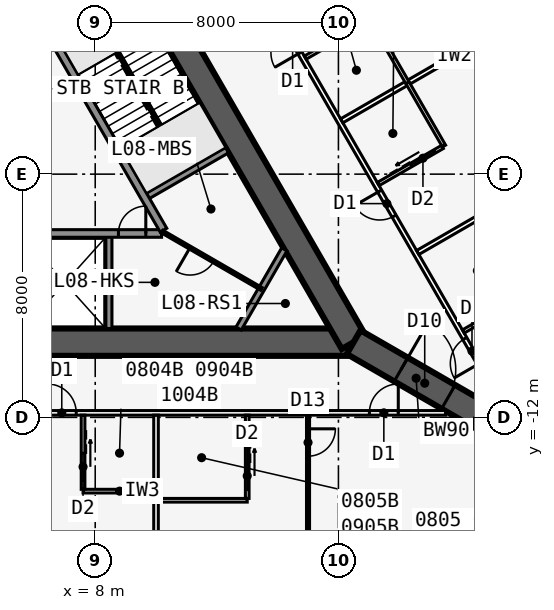
"""IFC4 building model, lengths in metres.
Left out: names, types, materials, properties, quantities, classifications, styles, units other than length and angle.
Written with IfcOpenShell. Run it as: python <this file> out.ifc"""

import sys

from ifc_helpers import new_model, si_unit, direction, frame, frame_2d, origin, place, context, subcontext, project, spatial, rectangle, extrude, element, fill, save


model = new_model("IFC4")
c1 = context("Model", 3, precision=1e-05, world=origin(), true_north=direction((0.0, 1.0)))
c2 = subcontext(c1, "Body", "Model", "MODEL_VIEW")
j1 = project(units=[si_unit("LENGTHUNIT", "METRE"), si_unit("PLANEANGLEUNIT", "RADIAN")], contexts=[c1])
p1 = place(None, origin())
s1 = spatial("IfcSite", under=j1, at=p1, CompositionType="ELEMENT")
p2 = place(p1, origin())
s2 = spatial("IfcBuilding", under=s1, at=p2, CompositionType="ELEMENT")
p3 = place(p2, frame((0.0, 0.0, 38.7)))
s3 = spatial("IfcBuildingStorey", under=s2, at=p3, CompositionType="ELEMENT", Elevation=38.7)
p4 = place(p3, frame((-16.5, -9.526, 0.0), z_axis=(0.0, 0.0, 1.0), x_axis=(1.0, 0.0, 0.0)))
e1 = element("IfcWall", 1, at=p4, inside=s3, PredefinedType="SHEAR", context=c2, shape_type="SweptSolid", body=[
    extrude(rectangle(XDim=33.0, YDim=0.9, at=frame_2d((16.5, 0.0))), origin(), (0.0, 0.0, 1.0), 3.4),
])
p5 = place(p4, frame((14.05, 0.0, 0.0)))
e2 = element("IfcOpeningElement", 2, at=p5, cuts=e1, PredefinedType="OPENING", context=c2, shape_type="SweptSolid", body=[
    extrude(rectangle(XDim=1.8, YDim=2.13, at=frame_2d((0.9, 1.065))), frame((0.0, 0.46, 0.0), z_axis=(0.0, -1.0, 0.0), x_axis=(1.0, 0.0, 0.0)), (0.0, 0.0, 1.0), 0.92),
])
p6 = place(p3, frame((-0.55, -5.951, 0.0), z_axis=(0.0, 0.0, 1.0), x_axis=(1.0, 0.0, 0.0)))
e3 = element("IfcWall", 3, at=p6, inside=s3, PredefinedType="SOLIDWALL", context=c2, shape_type="SweptSolid", body=[
    extrude(rectangle(XDim=10.733, YDim=0.25, at=frame_2d((5.366, 0.0))), origin(), (0.0, 0.0, 1.0), 3.235),
])
p7 = place(p6, frame((9.314, 0.0, 0.0)))
e4 = element("IfcOpeningElement", 4, at=p7, cuts=e3, PredefinedType="OPENING", context=c2, shape_type="SweptSolid", body=[
    extrude(rectangle(XDim=0.9, YDim=2.13, at=frame_2d((0.45, 1.065))), frame((0.0, 0.135, 0.0), z_axis=(0.0, -1.0, 0.0), x_axis=(1.0, 0.0, 0.0)), (0.0, 0.0, 1.0), 0.27),
])
p8 = place(p6, frame((1.05, 0.0, 0.0)))
e5 = element("IfcOpeningElement", 5, at=p8, cuts=e3, PredefinedType="OPENING", context=c2, shape_type="SweptSolid", body=[
    extrude(rectangle(XDim=1.1, YDim=2.13, at=frame_2d((0.55, 1.065))), frame((0.0, 0.135, 0.0), z_axis=(0.0, -1.0, 0.0), x_axis=(1.0, 0.0, 0.0)), (0.0, 0.0, 1.0), 0.27),
])
p9 = place(p6, frame((4.05, 0.0, 0.0)))
e6 = element("IfcOpeningElement", 6, at=p9, cuts=e3, PredefinedType="OPENING", context=c2, shape_type="SweptSolid", body=[
    extrude(rectangle(XDim=1.1, YDim=2.13, at=frame_2d((0.55, 1.065))), frame((0.0, 0.135, 0.0), z_axis=(0.0, -1.0, 0.0), x_axis=(1.0, 0.0, 0.0)), (0.0, 0.0, 1.0), 0.27),
])
p10 = place(p3, frame((8.45, -5.951, 0.0), z_axis=(0.0, 0.0, 1.0), x_axis=(0.0, -1.0, 0.0)))
e7 = element("IfcWall", 7, at=p10, inside=s3, PredefinedType="SOLIDWALL", context=c2, shape_type="SweptSolid", body=[
    extrude(rectangle(XDim=3.125, YDim=0.2, at=frame_2d((1.562, 0.0))), origin(), (0.0, 0.0, 1.0), 3.235),
])
p11 = place(p3, frame((16.5, -9.526, 0.0), z_axis=(0.0, 0.0, 1.0), x_axis=(-0.499999749417, 0.866025548458, 0.0)))
e8 = element("IfcWall", 8, at=p11, inside=s3, PredefinedType="SHEAR", context=c2, shape_type="SweptSolid", body=[
    extrude(rectangle(XDim=33.0, YDim=0.9, at=frame_2d((16.5, 0.0))), origin(), (0.0, 0.0, 1.0), 3.4),
])
p12 = place(p11, frame((14.15, 0.0, 0.0)))
e9 = element("IfcOpeningElement", 9, at=p12, cuts=e8, PredefinedType="OPENING", context=c2, shape_type="SweptSolid", body=[
    extrude(rectangle(XDim=1.8, YDim=2.13, at=frame_2d((0.9, 1.065))), frame((0.0, 0.46, 0.0), z_axis=(0.0, -1.0, 0.0), x_axis=(1.0, 0.0, 0.0)), (0.0, 0.0, 1.0), 0.92),
])
p13 = place(p11, frame((12.6, 0.0, 0.0)))
e10 = element("IfcOpeningElement", 10, at=p13, cuts=e8, PredefinedType="OPENING", context=c2, shape_type="SweptSolid", body=[
    extrude(rectangle(XDim=1.0, YDim=2.13, at=frame_2d((0.5, 1.065))), frame((0.0, 0.46, 0.0), z_axis=(0.0, -1.0, 0.0), x_axis=(1.0, 0.0, 0.0)), (0.0, 0.0, 1.0), 0.92),
])
p14 = place(p3, frame((10.245, -5.843, 0.0), z_axis=(0.0, 0.0, 1.0), x_axis=(-0.499993009313, 0.866029439822, 0.0)))
e11 = element("IfcWall", 11, at=p14, inside=s3, PredefinedType="SOLIDWALL", context=c2, shape_type="SweptSolid", body=[
    extrude(rectangle(XDim=7.733, YDim=0.25, at=frame_2d((3.866, 0.0))), origin(), (0.0, 0.0, 1.0), 3.235),
])
p15 = place(p3, frame((9.629, -4.775, 0.0), z_axis=(0.0, 0.0, 1.0), x_axis=(0.866022959057, 0.500004234368, 0.0)))
e12 = element("IfcWall", 12, at=p15, inside=s3, PredefinedType="SOLIDWALL", context=c2, shape_type="SweptSolid", body=[
    extrude(rectangle(XDim=3.125, YDim=0.2, at=frame_2d((1.562, 0.0))), origin(), (0.0, 0.0, 1.0), 3.235),
])
p16 = place(p3, frame((16.5, -9.526, 0.0), z_axis=(0.0, 0.0, 1.0), x_axis=(0.866031398331, -0.499989616998, 0.0)))
e13 = element("IfcWall", 13, at=p16, inside=s3, PredefinedType="SHEAR", context=c2, shape_type="SweptSolid", body=[
    extrude(rectangle(XDim=4.746, YDim=0.9, at=frame_2d((2.373, 0.0))), origin(), (0.0, 0.0, 1.0), 3.4),
])
p17 = place(p16, frame((1.8, 0.0, 0.0)))
e14 = element("IfcOpeningElement", 14, at=p17, cuts=e13, PredefinedType="OPENING", context=c2, shape_type="SweptSolid", body=[
    extrude(rectangle(XDim=1.8, YDim=2.13, at=frame_2d((0.9, 1.065))), frame((0.0, 0.46, 0.0), z_axis=(0.0, -1.0, 0.0), x_axis=(1.0, 0.0, 0.0)), (0.0, 0.0, 1.0), 0.92),
])
p18 = place(p3, frame((20.61, -11.899, 0.0), z_axis=(0.0, 0.0, 1.0), x_axis=(0.866009537788, -0.500027479704, 0.0)))
e15 = element("IfcWall", 15, at=p18, inside=s3, PredefinedType="SHEAR", context=c2, shape_type="SweptSolid", body=[
    extrude(rectangle(XDim=1.155, YDim=0.9, at=frame_2d((0.577, 0.0))), origin(), (0.0, 0.0, 1.0), 3.4),
])
p19 = place(p3, frame((-19.527, -11.851, 0.0), z_axis=(0.0, 0.0, 1.0), x_axis=(1.0, 0.0, 0.0)))
e16 = element("IfcWall", 16, at=p19, inside=s3, PredefinedType="PARTITIONING", context=c2, shape_type="SweptSolid", body=[
    extrude(rectangle(XDim=39.054, YDim=0.15, at=frame_2d((19.527, 0.0))), origin(), (0.0, 0.0, 1.0), 3.235),
])
p20 = place(p19, frame((0.352, 0.0, 0.0)))
e17 = element("IfcOpeningElement", 17, at=p20, cuts=e16, PredefinedType="OPENING", context=c2, shape_type="SweptSolid", body=[
    extrude(rectangle(XDim=0.95, YDim=2.13, at=frame_2d((0.475, 1.065))), frame((0.0, 0.085, 0.0), z_axis=(0.0, -1.0, 0.0), x_axis=(1.0, 0.0, 0.0)), (0.0, 0.0, 1.0), 0.17),
])
p21 = place(p19, frame((5.352, 0.0, 0.0)))
e18 = element("IfcOpeningElement", 18, at=p21, cuts=e16, PredefinedType="OPENING", context=c2, shape_type="SweptSolid", body=[
    extrude(rectangle(XDim=0.95, YDim=2.13, at=frame_2d((0.475, 1.065))), frame((0.0, 0.085, 0.0), z_axis=(0.0, -1.0, 0.0), x_axis=(1.0, 0.0, 0.0)), (0.0, 0.0, 1.0), 0.17),
])
p22 = place(p19, frame((12.752, 0.0, 0.0)))
e19 = element("IfcOpeningElement", 19, at=p22, cuts=e16, PredefinedType="OPENING", context=c2, shape_type="SweptSolid", body=[
    extrude(rectangle(XDim=0.95, YDim=2.13, at=frame_2d((0.475, 1.065))), frame((0.0, 0.085, 0.0), z_axis=(0.0, -1.0, 0.0), x_axis=(1.0, 0.0, 0.0)), (0.0, 0.0, 1.0), 0.17),
])
p23 = place(p19, frame((21.527, 0.0, 0.0)))
e20 = element("IfcOpeningElement", 20, at=p23, cuts=e16, PredefinedType="OPENING", context=c2, shape_type="SweptSolid", body=[
    extrude(rectangle(XDim=1.0, YDim=2.13, at=frame_2d((0.5, 1.065))), frame((0.0, 0.085, 0.0), z_axis=(0.0, -1.0, 0.0), x_axis=(1.0, 0.0, 0.0)), (0.0, 0.0, 1.0), 0.17),
])
p24 = place(p19, frame((25.952, 0.0, 0.0)))
e21 = element("IfcOpeningElement", 21, at=p24, cuts=e16, PredefinedType="OPENING", context=c2, shape_type="SweptSolid", body=[
    extrude(rectangle(XDim=0.95, YDim=2.13, at=frame_2d((0.475, 1.065))), frame((0.0, 0.085, 0.0), z_axis=(0.0, -1.0, 0.0), x_axis=(1.0, 0.0, 0.0)), (0.0, 0.0, 1.0), 0.17),
])
p25 = place(p19, frame((36.546, 0.0, 0.0)))
e22 = element("IfcOpeningElement", 22, at=p25, cuts=e16, PredefinedType="OPENING", context=c2, shape_type="SweptSolid", body=[
    extrude(rectangle(XDim=0.95, YDim=2.13, at=frame_2d((0.475, 1.065))), frame((0.0, 0.085, 0.0), z_axis=(0.0, -1.0, 0.0), x_axis=(1.0, 0.0, 0.0)), (0.0, 0.0, 1.0), 0.17),
])
p26 = place(p3, frame((10.0, -11.926, 0.0), z_axis=(0.0, 0.0, 1.0), x_axis=(0.0, -1.0, 0.0)))
e23 = element("IfcWall", 23, at=p26, inside=s3, PredefinedType="PARTITIONING", context=c2, shape_type="SweptSolid", body=[
    extrude(rectangle(XDim=9.485, YDim=0.15, at=frame_2d((4.742, 0.0))), origin(), (0.0, 0.0, 1.0), 2.389),
])
p27 = place(p3, frame((15.0, -11.926, 0.0), z_axis=(0.0, 0.0, 1.0), x_axis=(0.0, -1.0, 0.0)))
e24 = element("IfcWall", 24, at=p27, inside=s3, PredefinedType="PARTITIONING", context=c2, shape_type="SweptSolid", body=[
    extrude(rectangle(XDim=8.72, YDim=0.1, at=frame_2d((4.36, 0.0))), origin(), (0.0, 0.0, 1.0), 2.389),
])
p28 = place(p27, frame((0.45, 0.0, 0.0)))
e25 = element("IfcOpeningElement", 25, at=p28, cuts=e24, PredefinedType="OPENING", context=c2, shape_type="SweptSolid", body=[
    extrude(rectangle(XDim=0.9, YDim=2.13, at=frame_2d((0.45, 1.065))), frame((0.0, 0.06, 0.0), z_axis=(0.0, -1.0, 0.0), x_axis=(1.0, 0.0, 0.0)), (0.0, 0.0, 1.0), 0.12),
])
p29 = place(p3, frame((7.6, -14.426, 0.0), z_axis=(0.0, 0.0, 1.0), x_axis=(1.0, 0.0, 0.0)))
e26 = element("IfcWall", 26, at=p29, inside=s3, PredefinedType="PLUMBINGWALL", context=c2, shape_type="SweptSolid", body=[
    extrude(rectangle(XDim=2.4, YDim=0.12, at=frame_2d((1.2, 0.0))), origin(), (0.0, 0.0, 1.0), 3.235),
])
p30 = place(p3, frame((7.6, -11.926, 0.0), z_axis=(0.0, 0.0, 1.0), x_axis=(0.0, -1.0, 0.0)))
e27 = element("IfcWall", 27, at=p30, inside=s3, PredefinedType="PLUMBINGWALL", context=c2, shape_type="SweptSolid", body=[
    extrude(rectangle(XDim=2.44, YDim=0.12, at=frame_2d((1.22, 0.0))), origin(), (0.0, 0.0, 1.0), 3.235),
])
p31 = place(p30, frame((1.25, 0.0, 0.0)))
e28 = element("IfcOpeningElement", 28, at=p31, cuts=e27, PredefinedType="OPENING", context=c2, shape_type="SweptSolid", body=[
    extrude(rectangle(XDim=0.9, YDim=2.13, at=frame_2d((0.45, 1.065))), frame((0.0, 0.07, 0.0), z_axis=(0.0, -1.0, 0.0), x_axis=(1.0, 0.0, 0.0)), (0.0, 0.0, 1.0), 0.14),
])
p32 = place(p3, frame((10.0, -14.726, 0.0), z_axis=(0.0, 0.0, 1.0), x_axis=(1.0, 0.0, 0.0)))
e29 = element("IfcWall", 29, at=p32, inside=s3, PredefinedType="PLUMBINGWALL", context=c2, shape_type="SweptSolid", body=[
    extrude(rectangle(XDim=3.0, YDim=0.12, at=frame_2d((1.5, 0.0))), origin(), (0.0, 0.0, 1.0), 3.235),
])
p33 = place(p3, frame((13.0, -11.926, 0.0), z_axis=(0.0, 0.0, 1.0), x_axis=(0.0, -1.0, 0.0)))
e30 = element("IfcWall", 30, at=p33, inside=s3, PredefinedType="PLUMBINGWALL", context=c2, shape_type="SweptSolid", body=[
    extrude(rectangle(XDim=2.74, YDim=0.12, at=frame_2d((1.37, 0.0))), origin(), (0.0, 0.0, 1.0), 3.235),
])
p34 = place(p33, frame((1.55, 0.0, 0.0)))
e31 = element("IfcOpeningElement", 31, at=p34, cuts=e30, PredefinedType="OPENING", context=c2, shape_type="SweptSolid", body=[
    extrude(rectangle(XDim=0.9, YDim=2.13, at=frame_2d((0.45, 1.065))), frame((0.0, 0.07, 0.0), z_axis=(0.0, -1.0, 0.0), x_axis=(1.0, 0.0, 0.0)), (0.0, 0.0, 1.0), 0.14),
])
p35 = place(p3, frame((21.586, -11.885, 0.0), z_axis=(0.0, 0.0, 1.0), x_axis=(-0.500001915564, 0.86602429783, 0.0)))
e32 = element("IfcWall", 32, at=p35, inside=s3, PredefinedType="PARTITIONING", context=c2, shape_type="SweptSolid", body=[
    extrude(rectangle(XDim=42.172, YDim=0.15, at=frame_2d((21.086, 0.0))), origin(), (0.0, 0.0, 1.0), 3.235),
])
p36 = place(p35, frame((1.911, 0.0, 0.0)))
e33 = element("IfcOpeningElement", 33, at=p36, cuts=e32, PredefinedType="OPENING", context=c2, shape_type="SweptSolid", body=[
    extrude(rectangle(XDim=0.95, YDim=2.13, at=frame_2d((0.475, 1.065))), frame((0.0, 0.085, 0.0), z_axis=(0.0, -1.0, 0.0), x_axis=(1.0, 0.0, 0.0)), (0.0, 0.0, 1.0), 0.17),
])
p37 = place(p35, frame((7.511, 0.0, 0.0)))
e34 = element("IfcOpeningElement", 34, at=p37, cuts=e32, PredefinedType="OPENING", context=c2, shape_type="SweptSolid", body=[
    extrude(rectangle(XDim=0.95, YDim=2.13, at=frame_2d((0.475, 1.065))), frame((0.0, 0.085, 0.0), z_axis=(0.0, -1.0, 0.0), x_axis=(1.0, 0.0, 0.0)), (0.0, 0.0, 1.0), 0.17),
])
p38 = place(p35, frame((13.711, 0.0, 0.0)))
e35 = element("IfcOpeningElement", 35, at=p38, cuts=e32, PredefinedType="OPENING", context=c2, shape_type="SweptSolid", body=[
    extrude(rectangle(XDim=0.95, YDim=2.13, at=frame_2d((0.475, 1.065))), frame((0.0, 0.085, 0.0), z_axis=(0.0, -1.0, 0.0), x_axis=(1.0, 0.0, 0.0)), (0.0, 0.0, 1.0), 0.17),
])
p39 = place(p35, frame((21.911, 0.0, 0.0)))
e36 = element("IfcOpeningElement", 36, at=p39, cuts=e32, PredefinedType="OPENING", context=c2, shape_type="SweptSolid", body=[
    extrude(rectangle(XDim=0.95, YDim=2.13, at=frame_2d((0.475, 1.065))), frame((0.0, 0.085, 0.0), z_axis=(0.0, -1.0, 0.0), x_axis=(1.0, 0.0, 0.0)), (0.0, 0.0, 1.0), 0.17),
])
p40 = place(p35, frame((28.711, 0.0, 0.0)))
e37 = element("IfcOpeningElement", 37, at=p40, cuts=e32, PredefinedType="OPENING", context=c2, shape_type="SweptSolid", body=[
    extrude(rectangle(XDim=0.95, YDim=2.13, at=frame_2d((0.475, 1.065))), frame((0.0, 0.085, 0.0), z_axis=(0.0, -1.0, 0.0), x_axis=(1.0, 0.0, 0.0)), (0.0, 0.0, 1.0), 0.17),
])
p41 = place(p35, frame((31.911, 0.0, 0.0)))
e38 = element("IfcOpeningElement", 38, at=p41, cuts=e32, PredefinedType="OPENING", context=c2, shape_type="SweptSolid", body=[
    extrude(rectangle(XDim=0.95, YDim=2.13, at=frame_2d((0.475, 1.065))), frame((0.0, 0.085, 0.0), z_axis=(0.0, -1.0, 0.0), x_axis=(1.0, 0.0, 0.0)), (0.0, 0.0, 1.0), 0.17),
])
p42 = place(p35, frame((39.311, 0.0, 0.0)))
e39 = element("IfcOpeningElement", 39, at=p42, cuts=e32, PredefinedType="OPENING", context=c2, shape_type="SweptSolid", body=[
    extrude(rectangle(XDim=0.95, YDim=2.13, at=frame_2d((0.475, 1.065))), frame((0.0, 0.085, 0.0), z_axis=(0.0, -1.0, 0.0), x_axis=(1.0, 0.0, 0.0)), (0.0, 0.0, 1.0), 0.17),
])
p43 = place(p3, frame((18.608, -6.577, 0.0), z_axis=(0.0, 0.0, 1.0), x_axis=(0.866034818847, 0.499983692279, 0.0)))
e40 = element("IfcWall", 40, at=p43, inside=s3, PredefinedType="PARTITIONING", context=c2, shape_type="SweptSolid", body=[
    extrude(rectangle(XDim=7.82, YDim=0.15, at=frame_2d((3.91, 0.0))), origin(), (0.0, 0.0, 1.0), 2.389),
])
p44 = place(p3, frame((16.108, -2.247, 0.0), z_axis=(0.0, 0.0, 1.0), x_axis=(0.866018881988, 0.500011295912, 0.0)))
e41 = element("IfcWall", 41, at=p44, inside=s3, PredefinedType="PARTITIONING", context=c2, shape_type="SweptSolid", body=[
    extrude(rectangle(XDim=8.585, YDim=0.15, at=frame_2d((4.292, 0.0))), origin(), (0.0, 0.0, 1.0), 2.389),
])
p45 = place(p3, frame((20.108, -9.175, 0.0), z_axis=(0.0, 0.0, 1.0), x_axis=(0.866035715982, 0.499982138324, 0.0)))
e42 = element("IfcWall", 42, at=p45, inside=s3, PredefinedType="PLUMBINGWALL", context=c2, shape_type="SweptSolid", body=[
    extrude(rectangle(XDim=2.74, YDim=0.12, at=frame_2d((1.37, 0.0))), origin(), (0.0, 0.0, 1.0), 3.235),
])
p46 = place(p45, frame((1.55, 0.0, 0.0)))
e43 = element("IfcOpeningElement", 43, at=p46, cuts=e42, PredefinedType="OPENING", context=c2, shape_type="SweptSolid", body=[
    extrude(rectangle(XDim=0.9, YDim=2.13, at=frame_2d((0.45, 1.065))), frame((0.0, 0.07, 0.0), z_axis=(0.0, -1.0, 0.0), x_axis=(1.0, 0.0, 0.0)), (0.0, 0.0, 1.0), 0.14),
])
p47 = place(p3, frame((19.473, -3.076, 0.0), z_axis=(0.0, 0.0, 1.0), x_axis=(-0.499957262057, 0.866050077142, 0.0)))
e44 = element("IfcWall", 44, at=p47, inside=s3, PredefinedType="PLUMBINGWALL", context=c2, shape_type="SweptSolid", body=[
    extrude(rectangle(XDim=2.4, YDim=0.12, at=frame_2d((1.2, 0.0))), origin(), (0.0, 0.0, 1.0), 3.235),
])
p48 = place(p3, frame((17.308, -4.326, 0.0), z_axis=(0.0, 0.0, 1.0), x_axis=(0.866023955769, 0.500002508028, 0.0)))
e45 = element("IfcWall", 45, at=p48, inside=s3, PredefinedType="PLUMBINGWALL", context=c2, shape_type="SweptSolid", body=[
    extrude(rectangle(XDim=2.44, YDim=0.12, at=frame_2d((1.22, 0.0))), origin(), (0.0, 0.0, 1.0), 3.235),
])
p49 = place(p48, frame((1.25, 0.0, 0.0)))
e46 = element("IfcOpeningElement", 46, at=p49, cuts=e45, PredefinedType="OPENING", context=c2, shape_type="SweptSolid", body=[
    extrude(rectangle(XDim=0.9, YDim=2.13, at=frame_2d((0.45, 1.065))), frame((0.0, 0.07, 0.0), z_axis=(0.0, -1.0, 0.0), x_axis=(1.0, 0.0, 0.0)), (0.0, 0.0, 1.0), 0.14),
])
p50 = place(p3, frame((18.273, -0.997, 0.0), z_axis=(0.0, 0.0, 1.0), x_axis=(-0.500001309137, 0.866024647952, 0.0)))
e47 = element("IfcWall", 47, at=p50, inside=s3, PredefinedType="PLUMBINGWALL", context=c2, shape_type="SweptSolid", body=[
    extrude(rectangle(XDim=2.4, YDim=0.12, at=frame_2d((1.2, 0.0))), origin(), (0.0, 0.0, 1.0), 3.235),
])
p51 = place(p3, frame((14.908, -0.169, 0.0), z_axis=(0.0, 0.0, 1.0), x_axis=(0.866023955769, 0.500002508028, 0.0)))
e48 = element("IfcWall", 48, at=p51, inside=s3, PredefinedType="PLUMBINGWALL", context=c2, shape_type="SweptSolid", body=[
    extrude(rectangle(XDim=2.44, YDim=0.12, at=frame_2d((1.22, 0.0))), origin(), (0.0, 0.0, 1.0), 3.235),
])
p52 = place(p51, frame((1.25, 0.0, 0.0)))
e49 = element("IfcOpeningElement", 49, at=p52, cuts=e48, PredefinedType="OPENING", context=c2, shape_type="SweptSolid", body=[
    extrude(rectangle(XDim=0.9, YDim=2.13, at=frame_2d((0.45, 1.065))), frame((0.0, 0.07, 0.0), z_axis=(0.0, -1.0, 0.0), x_axis=(1.0, 0.0, 0.0)), (0.0, 0.0, 1.0), 0.14),
])
p53 = place(p3, frame((14.219, -6.476, 0.0), z_axis=(0.0, 0.0, 1.0), x_axis=(-0.499952404951, -0.866052881055, 0.0)))
e50 = element("IfcWall", 50, at=p53, inside=s3, PredefinedType="SOLIDWALL", context=c2, shape_type="SweptSolid", body=[
    extrude(rectangle(XDim=3.002, YDim=0.2, at=frame_2d((1.501, 0.0))), origin(), (0.0, 0.0, 1.0), 3.235),
])
p54 = place(p3, frame((13.469, -7.776, 0.0), z_axis=(0.0, 0.0, 1.0), x_axis=(-0.866021898093, 0.500006071987, 0.0)))
e51 = element("IfcWall", 51, at=p54, inside=s3, PredefinedType="PARTITIONING", context=c2, shape_type="SweptSolid", body=[
    extrude(rectangle(XDim=3.775, YDim=0.1, at=frame_2d((1.888, 0.0))), origin(), (0.0, 0.0, 1.0), 3.235),
])
p55 = place(p54, frame((1.815, 0.0, 0.0)))
e52 = element("IfcOpeningElement", 52, at=p55, cuts=e51, PredefinedType="OPENING", context=c2, shape_type="SweptSolid", body=[
    extrude(rectangle(XDim=0.9, YDim=2.13, at=frame_2d((0.45, 1.065))), frame((0.0, 0.06, 0.0), z_axis=(0.0, -1.0, 0.0), x_axis=(1.0, 0.0, 0.0)), (0.0, 0.0, 1.0), 0.12),
])
p56 = place(p3, frame((10.135, -2.401, 0.0), z_axis=(0.0, 0.0, 1.0), x_axis=(-0.499992232847, 0.866029888106, 0.0)))
e53 = element("IfcWall", 53, at=p56, inside=s3, PredefinedType="SOLIDWALL", context=c2, shape_type="SweptSolid", body=[
    extrude(rectangle(XDim=2.794, YDim=0.1, at=frame_2d((1.397, 0.0))), origin(), (0.0, 0.0, 1.0), 3.4),
])
p57 = place(p28, origin())
e54 = element("IfcDoor", 54, at=p57, inside=s3, OperationType="SINGLE_SWING_LEFT", PredefinedType="DOOR", context=c2, shape_type="SweptSolid", body=[
    extrude(rectangle(XDim=0.9, YDim=2.13, at=frame_2d((0.45, 1.065))), frame((0.0, 0.025, 0.0), z_axis=(0.0, -1.0, 0.0), x_axis=(1.0, 0.0, 0.0)), (0.0, 0.0, 1.0), 0.05),
])
fill(e25, e54)
p58 = place(p31, origin())
e55 = element("IfcDoor", 55, at=p58, inside=s3, OperationType="SLIDING_TO_LEFT", PredefinedType="DOOR", context=c2, shape_type="SweptSolid", body=[
    extrude(rectangle(XDim=0.9, YDim=2.13, at=frame_2d((0.45, 1.065))), frame((0.0, 0.025, 0.0), z_axis=(0.0, -1.0, 0.0), x_axis=(1.0, 0.0, 0.0)), (0.0, 0.0, 1.0), 0.05),
])
fill(e28, e55)
p59 = place(p24, origin())
e56 = element("IfcDoor", 56, at=p59, inside=s3, OperationType="SINGLE_SWING_LEFT", PredefinedType="DOOR", context=c2, shape_type="SweptSolid", body=[
    extrude(rectangle(XDim=0.95, YDim=2.13, at=frame_2d((0.475, 1.065))), frame((0.0, 0.025, 0.0), z_axis=(0.0, -1.0, 0.0), x_axis=(1.0, 0.0, 0.0)), (0.0, 0.0, 1.0), 0.05),
])
fill(e21, e56)
p60 = place(p34, origin())
e57 = element("IfcDoor", 57, at=p60, inside=s3, OperationType="SLIDING_TO_LEFT", PredefinedType="DOOR", context=c2, shape_type="SweptSolid", body=[
    extrude(rectangle(XDim=0.9, YDim=2.13, at=frame_2d((0.45, 1.065))), frame((0.0, 0.025, 0.0), z_axis=(0.0, -1.0, 0.0), x_axis=(1.0, 0.0, 0.0)), (0.0, 0.0, 1.0), 0.05),
])
fill(e31, e57)
p61 = place(p25, origin())
e58 = element("IfcDoor", 58, at=p61, inside=s3, OperationType="SINGLE_SWING_RIGHT", PredefinedType="DOOR", context=c2, shape_type="SweptSolid", body=[
    extrude(rectangle(XDim=0.95, YDim=2.13, at=frame_2d((0.475, 1.065))), frame((0.0, 0.025, 0.0), z_axis=(0.0, -1.0, 0.0), x_axis=(1.0, 0.0, 0.0)), (0.0, 0.0, 1.0), 0.05),
])
fill(e22, e58)
p62 = place(p36, origin())
e59 = element("IfcDoor", 59, at=p62, inside=s3, OperationType="SINGLE_SWING_LEFT", PredefinedType="DOOR", context=c2, shape_type="SweptSolid", body=[
    extrude(rectangle(XDim=0.95, YDim=2.13, at=frame_2d((0.475, 1.065))), frame((0.0, 0.025, 0.0), z_axis=(0.0, -1.0, 0.0), x_axis=(1.0, 0.0, 0.0)), (0.0, 0.0, 1.0), 0.05),
])
fill(e33, e59)
p63 = place(p49, origin())
e60 = element("IfcDoor", 60, at=p63, inside=s3, OperationType="SLIDING_TO_LEFT", PredefinedType="DOOR", context=c2, shape_type="SweptSolid", body=[
    extrude(rectangle(XDim=0.9, YDim=2.13, at=frame_2d((0.45, 1.065))), frame((0.0, 0.025, 0.0), z_axis=(0.0, -1.0, 0.0), x_axis=(1.0, 0.0, 0.0)), (0.0, 0.0, 1.0), 0.05),
])
fill(e46, e60)
p64 = place(p37, origin())
e61 = element("IfcDoor", 61, at=p64, inside=s3, OperationType="SINGLE_SWING_RIGHT", PredefinedType="DOOR", context=c2, shape_type="SweptSolid", body=[
    extrude(rectangle(XDim=0.95, YDim=2.13, at=frame_2d((0.475, 1.065))), frame((0.0, 0.025, 0.0), z_axis=(0.0, -1.0, 0.0), x_axis=(1.0, 0.0, 0.0)), (0.0, 0.0, 1.0), 0.05),
])
fill(e34, e61)
p65 = place(p38, origin())
e62 = element("IfcDoor", 62, at=p65, inside=s3, OperationType="SINGLE_SWING_LEFT", PredefinedType="DOOR", context=c2, shape_type="SweptSolid", body=[
    extrude(rectangle(XDim=0.95, YDim=2.13, at=frame_2d((0.475, 1.065))), frame((0.0, 0.025, 0.0), z_axis=(0.0, -1.0, 0.0), x_axis=(1.0, 0.0, 0.0)), (0.0, 0.0, 1.0), 0.05),
])
fill(e35, e62)
p66 = place(p17, origin())
e63 = element("IfcDoor", 63, at=p66, inside=s3, OperationType="DOUBLE_DOOR_DOUBLE_SWING", PredefinedType="DOOR", context=c2, shape_type="SweptSolid", body=[
    extrude(rectangle(XDim=1.8, YDim=2.13, at=frame_2d((0.9, 1.065))), frame((0.0, 0.025, 0.0), z_axis=(0.0, -1.0, 0.0), x_axis=(1.0, 0.0, 0.0)), (0.0, 0.0, 1.0), 0.05),
])
fill(e14, e63)
p67 = place(p7, origin())
e64 = element("IfcDoor", 64, at=p67, inside=s3, OperationType="SINGLE_SWING_RIGHT", PredefinedType="DOOR", context=c2, shape_type="SweptSolid", body=[
    extrude(rectangle(XDim=0.9, YDim=2.13, at=frame_2d((0.45, 1.065))), frame((0.0, 0.025, 0.0), z_axis=(0.0, -1.0, 0.0), x_axis=(1.0, 0.0, 0.0)), (0.0, 0.0, 1.0), 0.05),
])
fill(e4, e64)
p68 = place(p55, origin())
e65 = element("IfcDoor", 65, at=p68, inside=s3, OperationType="SINGLE_SWING_RIGHT", PredefinedType="DOOR", context=c2, shape_type="SweptSolid", body=[
    extrude(rectangle(XDim=0.9, YDim=2.13, at=frame_2d((0.45, 1.065))), frame((0.0, 0.025, 0.0), z_axis=(0.0, -1.0, 0.0), x_axis=(1.0, 0.0, 0.0)), (0.0, 0.0, 1.0), 0.05),
])
fill(e52, e65)
save(model, sys.argv[1])
